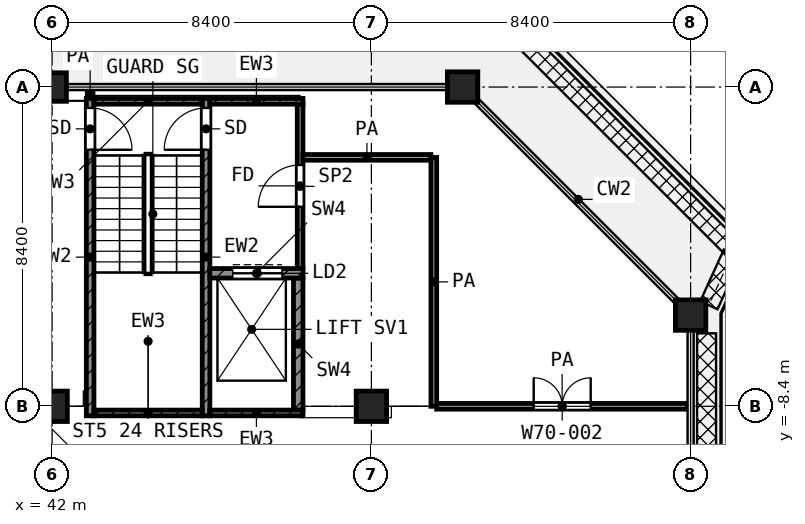
"""IFC4 building model, lengths in metres.
Left out: names, types, materials, properties, quantities, classifications, styles, units other than length and angle.
Written with IfcOpenShell. Run it as: python <this file> out.ifc"""

import sys

from ifc_helpers import new_model, si_unit, direction, frame, frame_2d, origin, origin_2d, place, context, subcontext, project, spatial, rectangle, extrude, element, fill, save


model = new_model("IFC4")
c1 = context("Model", 3, precision=1e-05, world=origin(), true_north=direction((0.0, 1.0)))
c2 = subcontext(c1, "Body", "Model", "MODEL_VIEW")
j1 = project(units=[si_unit("LENGTHUNIT", "METRE"), si_unit("PLANEANGLEUNIT", "RADIAN")], contexts=[c1])
p1 = place(None, origin())
s1 = spatial("IfcSite", under=j1, at=p1, CompositionType="ELEMENT")
p2 = place(p1, origin())
s2 = spatial("IfcBuilding", under=s1, at=p2, CompositionType="ELEMENT")
p3 = place(p2, frame((0.0, 0.0, 302.8)))
s3 = spatial("IfcBuildingStorey", under=s2, at=p3, CompositionType="ELEMENT", Elevation=302.8)
p4 = place(p3, frame((42.0, 0.0, 0.0), z_axis=(0.0, 0.0, 1.0), x_axis=(1.0, 0.0, 0.0)))
e1 = element("IfcColumn", 1, at=p4, inside=s3, PredefinedType="COLUMN", context=c2, shape_type="SweptSolid", body=[
    extrude(rectangle(XDim=0.75, YDim=0.75, at=origin_2d()), origin(), (0.0, 0.0, 1.0), 4.2),
])
for number, where, z_axis, x_axis in (
    (2, (52.8, 0.0, 0.0), (0.0, 0.0, 1.0), (1.0, 0.0, 0.0)),
    (3, (58.8, -6.0, 0.0), (0.0, 0.0, 1.0), (1.0, 0.0, 0.0)),
    (4, (42.0, -8.4, 0.0), (0.0, 0.0, 1.0), (1.0, 0.0, 0.0)),
    (5, (50.4, -8.4, 0.0), (0.0, 0.0, 1.0), (1.0, 0.0, 0.0)),
):
    element("IfcColumn", number, at=place(p3, frame(where, z_axis=z_axis, x_axis=x_axis)), inside=s3, PredefinedType="COLUMN", context=c2, shape_type="SweptSolid", body=[
        extrude(rectangle(XDim=0.8, YDim=0.8, at=origin_2d()), origin(), (0.0, 0.0, 1.0), 4.2),
    ])
p5 = place(p3, frame((43.0, -8.65, 0.0), z_axis=(0.0, 0.0, 1.0), x_axis=(0.0, 1.0, 0.0)))
e6 = element("IfcWall", 6, at=p5, inside=s3, PredefinedType="SHEAR", context=c2, shape_type="SweptSolid", body=[
    extrude(rectangle(XDim=8.35, YDim=0.2, at=frame_2d((4.175, 0.0))), origin(), (0.0, 0.0, 1.0), 3.6),
])
p6 = place(p5, frame((7.0, 0.0, 0.0)))
e7 = element("IfcOpeningElement", 7, at=p6, cuts=e6, PredefinedType="OPENING", context=c2, shape_type="SweptSolid", body=[
    extrude(rectangle(XDim=1.1, YDim=2.1, at=frame_2d((0.55, 1.05))), frame((0.0, 0.11, 0.0), z_axis=(0.0, -1.0, 0.0), x_axis=(1.0, 0.0, 0.0)), (0.0, 0.0, 1.0), 0.22),
])
p7 = place(p3, frame((46.05, -8.65, 0.0), z_axis=(0.0, 0.0, 1.0), x_axis=(0.0, 1.0, 0.0)))
e8 = element("IfcWall", 8, at=p7, inside=s3, PredefinedType="SHEAR", context=c2, shape_type="SweptSolid", body=[
    extrude(rectangle(XDim=8.35, YDim=0.2, at=frame_2d((4.175, 0.0))), origin(), (0.0, 0.0, 1.0), 3.6),
])
p8 = place(p7, frame((7.0, 0.0, 0.0)))
e9 = element("IfcOpeningElement", 9, at=p8, cuts=e8, PredefinedType="OPENING", context=c2, shape_type="SweptSolid", body=[
    extrude(rectangle(XDim=1.1, YDim=2.1, at=frame_2d((0.55, 1.05))), frame((0.0, 0.11, 0.0), z_axis=(0.0, -1.0, 0.0), x_axis=(1.0, 0.0, 0.0)), (0.0, 0.0, 1.0), 0.22),
])
p9 = place(p3, frame((43.1, -0.375, 0.0), z_axis=(0.0, 0.0, 1.0), x_axis=(1.0, 0.0, 0.0)))
e10 = element("IfcWall", 10, at=p9, inside=s3, PredefinedType="SHEAR", context=c2, shape_type="SweptSolid", body=[
    extrude(rectangle(XDim=2.85, YDim=0.15, at=frame_2d((1.425, 0.0))), origin(), (0.0, 0.0, 1.0), 3.6),
])
p10 = place(p3, frame((46.15, -0.375, 0.0), z_axis=(0.0, 0.0, 1.0), x_axis=(1.0, 0.0, 0.0)))
e11 = element("IfcWall", 11, at=p10, inside=s3, PredefinedType="SHEAR", context=c2, shape_type="SweptSolid", body=[
    extrude(rectangle(XDim=2.45, YDim=0.15, at=frame_2d((1.225, 0.0))), origin(), (0.0, 0.0, 1.0), 3.6),
])
p11 = place(p3, frame((43.1, -8.575, 0.0), z_axis=(0.0, 0.0, 1.0), x_axis=(1.0, 0.0, 0.0)))
e12 = element("IfcWall", 12, at=p11, inside=s3, PredefinedType="SHEAR", context=c2, shape_type="SweptSolid", body=[
    extrude(rectangle(XDim=2.85, YDim=0.15, at=frame_2d((1.425, 0.0))), origin(), (0.0, 0.0, 1.0), 3.6),
])
p12 = place(p3, frame((46.15, -8.575, 0.0), z_axis=(0.0, 0.0, 1.0), x_axis=(1.0, 0.0, 0.0)))
e13 = element("IfcWall", 13, at=p12, inside=s3, PredefinedType="SHEAR", context=c2, shape_type="SweptSolid", body=[
    extrude(rectangle(XDim=2.45, YDim=0.15, at=frame_2d((1.225, 0.0))), origin(), (0.0, 0.0, 1.0), 3.6),
])
p13 = place(p3, frame((46.15, -4.9, 0.0), z_axis=(0.0, 0.0, 1.0), x_axis=(1.0, 0.0, 0.0)))
e14 = element("IfcWall", 14, at=p13, inside=s3, PredefinedType="SHEAR", context=c2, shape_type="SweptSolid", body=[
    extrude(rectangle(XDim=2.45, YDim=0.25, at=frame_2d((1.225, 0.0))), origin(), (0.0, 0.0, 1.0), 3.6),
])
p14 = place(p13, frame((0.6, 0.0, 0.0)))
e15 = element("IfcOpeningElement", 15, at=p14, cuts=e14, PredefinedType="OPENING", context=c2, shape_type="SweptSolid", body=[
    extrude(rectangle(XDim=1.3, YDim=2.1, at=frame_2d((0.65, 1.05))), frame((0.0, 0.135, 0.0), z_axis=(0.0, -1.0, 0.0), x_axis=(1.0, 0.0, 0.0)), (0.0, 0.0, 1.0), 0.27),
])
p15 = place(p3, frame((48.475, -8.5, 0.0), z_axis=(0.0, 0.0, 1.0), x_axis=(0.0, 1.0, 0.0)))
e16 = element("IfcWall", 16, at=p15, inside=s3, PredefinedType="SHEAR", context=c2, shape_type="SweptSolid", body=[
    extrude(rectangle(XDim=3.475, YDim=0.25, at=frame_2d((1.738, 0.0))), origin(), (0.0, 0.0, 1.0), 3.6),
])
p16 = place(p3, frame((48.525, -4.775, 0.0), z_axis=(0.0, 0.0, 1.0), x_axis=(0.0, 1.0, 0.0)))
e17 = element("IfcWall", 17, at=p16, inside=s3, PredefinedType="PARTITIONING", context=c2, shape_type="SweptSolid", body=[
    extrude(rectangle(XDim=4.325, YDim=0.15, at=frame_2d((2.163, 0.0))), origin(), (0.0, 0.0, 1.0), 3.6),
])
p17 = place(p16, frame((1.625, 0.0, 0.0)))
e18 = element("IfcOpeningElement", 18, at=p17, cuts=e17, PredefinedType="OPENING", context=c2, shape_type="SweptSolid", body=[
    extrude(rectangle(XDim=1.1, YDim=2.1, at=frame_2d((0.55, 1.05))), frame((0.0, 0.085, 0.0), z_axis=(0.0, -1.0, 0.0), x_axis=(1.0, 0.0, 0.0)), (0.0, 0.0, 1.0), 0.17),
])
p18 = place(p3, frame((52.118, -8.4, 0.0), z_axis=(0.0, 0.0, 1.0), x_axis=(1.0, 0.0, 0.0)))
e19 = element("IfcWall", 19, at=p18, inside=s3, PredefinedType="PARTITIONING", context=c2, shape_type="SweptSolid", body=[
    extrude(rectangle(XDim=6.602, YDim=0.15, at=frame_2d((3.301, 0.0))), origin(), (0.0, 0.0, 1.0), 3.6),
])
p19 = place(p18, frame((2.553, 0.0, 0.0)))
e20 = element("IfcOpeningElement", 20, at=p19, cuts=e19, PredefinedType="OPENING", context=c2, shape_type="SweptSolid", body=[
    extrude(rectangle(XDim=1.5, YDim=2.1, at=frame_2d((0.75, 1.05))), frame((0.0, 0.085, 0.0), z_axis=(0.0, -1.0, 0.0), x_axis=(1.0, 0.0, 0.0)), (0.0, 0.0, 1.0), 0.17),
])
p20 = place(p3, frame((48.6, -1.85, 0.0), z_axis=(0.0, 0.0, 1.0), x_axis=(1.0, 0.0, 0.0)))
e21 = element("IfcWall", 21, at=p20, inside=s3, PredefinedType="PARTITIONING", context=c2, shape_type="SweptSolid", body=[
    extrude(rectangle(XDim=3.366, YDim=0.15, at=frame_2d((1.683, 0.0))), origin(), (0.0, 0.0, 1.0), 3.6),
])
p21 = place(p3, frame((43.0, -0.27, 0.0), z_axis=(0.0, 0.0, 1.0), x_axis=(0.0, 1.0, 0.0)))
e22 = element("IfcWall", 22, at=p21, inside=s3, PredefinedType="PARTITIONING", context=c2, shape_type="SweptSolid", body=[
    extrude(rectangle(XDim=0.19, YDim=0.15, at=frame_2d((0.095, 0.0))), origin(), (0.0, 0.0, 1.0), 3.6),
])
p22 = place(p3, frame((52.043, -8.4, 0.0), z_axis=(0.0, 0.0, 1.0), x_axis=(0.0, 1.0, 0.0)))
e23 = element("IfcWall", 23, at=p22, inside=s3, PredefinedType="PARTITIONING", context=c2, shape_type="SweptSolid", body=[
    extrude(rectangle(XDim=6.548, YDim=0.15, at=frame_2d((3.274, 0.0))), origin(), (0.0, 0.0, 1.0), 3.6),
])
p23 = place(p6, frame((1.1, 0.0, 0.0), z_axis=(0.0, 0.0, 1.0), x_axis=(-1.0, 0.0, 0.0)))
e24 = element("IfcDoor", 24, at=p23, inside=s3, OperationType="SINGLE_SWING_LEFT", PredefinedType="DOOR", context=c2, shape_type="SweptSolid", body=[
    extrude(rectangle(XDim=1.1, YDim=2.1, at=frame_2d((0.55, 1.05))), frame((0.0, 0.025, 0.0), z_axis=(0.0, -1.0, 0.0), x_axis=(1.0, 0.0, 0.0)), (0.0, 0.0, 1.0), 0.05),
])
fill(e7, e24)
p24 = place(p8, origin())
e25 = element("IfcDoor", 25, at=p24, inside=s3, OperationType="SINGLE_SWING_LEFT", PredefinedType="DOOR", context=c2, shape_type="SweptSolid", body=[
    extrude(rectangle(XDim=1.1, YDim=2.1, at=frame_2d((0.55, 1.05))), frame((0.0, 0.025, 0.0), z_axis=(0.0, -1.0, 0.0), x_axis=(1.0, 0.0, 0.0)), (0.0, 0.0, 1.0), 0.05),
])
fill(e9, e25)
p25 = place(p14, origin())
e26 = element("IfcDoor", 26, at=p25, inside=s3, OperationType="DOUBLE_DOOR_SLIDING", PredefinedType="DOOR", context=c2, shape_type="SweptSolid", body=[
    extrude(rectangle(XDim=1.3, YDim=2.1, at=frame_2d((0.65, 1.05))), frame((0.0, 0.025, 0.0), z_axis=(0.0, -1.0, 0.0), x_axis=(1.0, 0.0, 0.0)), (0.0, 0.0, 1.0), 0.05),
])
fill(e15, e26)
p26 = place(p17, origin())
e27 = element("IfcDoor", 27, at=p26, inside=s3, OperationType="SINGLE_SWING_LEFT", PredefinedType="DOOR", context=c2, shape_type="SweptSolid", body=[
    extrude(rectangle(XDim=1.1, YDim=2.1, at=frame_2d((0.55, 1.05))), frame((0.0, 0.025, 0.0), z_axis=(0.0, -1.0, 0.0), x_axis=(1.0, 0.0, 0.0)), (0.0, 0.0, 1.0), 0.05),
])
fill(e18, e27)
p27 = place(p19, origin())
e28 = element("IfcDoor", 28, at=p27, inside=s3, OperationType="DOUBLE_DOOR_SINGLE_SWING", PredefinedType="DOOR", context=c2, shape_type="SweptSolid", body=[
    extrude(rectangle(XDim=1.5, YDim=2.1, at=frame_2d((0.75, 1.05))), frame((0.0, 0.025, 0.0), z_axis=(0.0, -1.0, 0.0), x_axis=(1.0, 0.0, 0.0)), (0.0, 0.0, 1.0), 0.05),
])
fill(e20, e28)
save(model, sys.argv[1])
